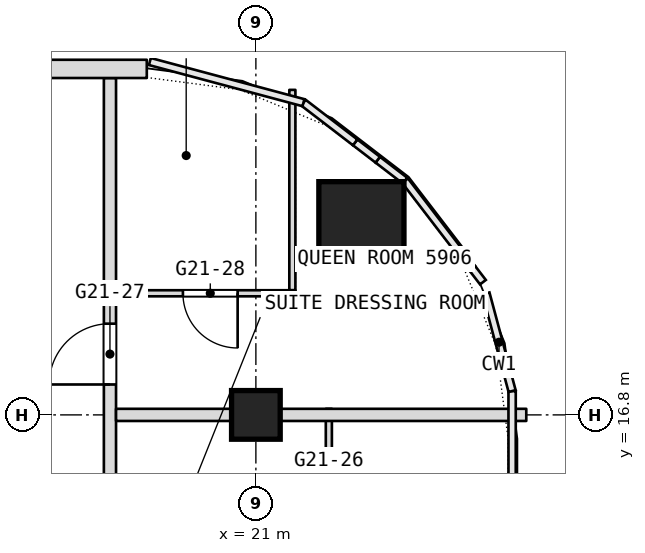
"""IFC4 building model, lengths in metres.
Left out: names, types, materials, properties, quantities, classifications, styles, units other than length and angle.
Written with IfcOpenShell. Run it as: python <this file> out.ifc"""

import sys

from ifc_helpers import new_model, si_unit, direction, frame, frame_2d, origin, origin_2d, place, context, subcontext, project, spatial, rectangle, extrude, element, fill, save


model = new_model("IFC4")
c1 = context("Model", 3, precision=1e-05, world=origin(), true_north=direction((0.0, 1.0)))
c2 = subcontext(c1, "Body", "Model", "MODEL_VIEW")
j1 = project(units=[si_unit("LENGTHUNIT", "METRE"), si_unit("PLANEANGLEUNIT", "RADIAN")], contexts=[c1])
p1 = place(None, origin())
s1 = spatial("IfcSite", under=j1, at=p1, CompositionType="ELEMENT")
p2 = place(p1, origin())
s2 = spatial("IfcBuilding", under=s1, at=p2, CompositionType="ELEMENT")
p3 = place(p2, frame((0.0, 0.0, 248.9)))
s3 = spatial("IfcBuildingStorey", under=s2, at=p3, CompositionType="ELEMENT", Elevation=248.9)
p4 = place(p3, frame((22.736, 19.936, 0.0), z_axis=(0.0, 0.0, 1.0), x_axis=(1.0, 0.0, 0.0)))
e1 = element("IfcColumn", 1, at=p4, inside=s3, PredefinedType="COLUMN", context=c2, shape_type="SweptSolid", body=[
    extrude(rectangle(XDim=1.4, YDim=1.4, at=origin_2d()), origin(), (0.0, 0.0, 1.0), 3.6),
])
p5 = place(p3, frame((21.0, 16.8, 0.0), z_axis=(0.0, 0.0, 1.0), x_axis=(1.0, 0.0, 0.0)))
e2 = element("IfcColumn", 2, at=p5, inside=s3, PredefinedType="COLUMN", context=c2, shape_type="SweptSolid", body=[
    extrude(rectangle(XDim=0.8, YDim=0.8, at=origin_2d()), origin(), (0.0, 0.0, 1.0), 3.6),
])
p6 = place(p3, frame((22.2, 14.45, 0.0), z_axis=(0.0, 0.0, 1.0), x_axis=(0.0, 1.0, 0.0)))
e3 = element("IfcWall", 3, at=p6, inside=s3, PredefinedType="PARTITIONING", context=c2, shape_type="SweptSolid", body=[
    extrude(rectangle(XDim=2.45, YDim=0.1, at=frame_2d((1.225, 0.0))), origin(), (0.0, 0.0, 1.0), 3.3),
])
p7 = place(p6, frame((0.15, 0.0, 0.0)))
e4 = element("IfcOpeningElement", 4, at=p7, cuts=e3, PredefinedType="OPENING", context=c2, shape_type="SweptSolid", body=[
    extrude(rectangle(XDim=0.9, YDim=2.1, at=frame_2d((0.45, 1.05))), frame((0.0, 0.05, 0.0), z_axis=(0.0, -1.0, 0.0), x_axis=(1.0, 0.0, 0.0)), (0.0, 0.0, 1.0), 0.1),
])
p8 = place(p3, frame((21.6, 18.85, 0.0), z_axis=(0.0, 0.0, 1.0), x_axis=(0.0, 1.0, 0.0)))
e5 = element("IfcWall", 5, at=p8, inside=s3, PredefinedType="PARTITIONING", context=c2, shape_type="SweptSolid", body=[
    extrude(rectangle(XDim=3.295, YDim=0.1, at=frame_2d((1.647, 0.0))), origin(), (0.0, 0.0, 1.0), 3.3),
])
p9 = place(p3, frame((18.6, -26.751, 0.0), z_axis=(0.0, 0.0, 1.0), x_axis=(0.0, 1.0, 0.0)))
e6 = element("IfcWall", 6, at=p9, inside=s3, PredefinedType="PARTITIONING", context=c2, shape_type="SweptSolid", body=[
    extrude(rectangle(XDim=49.091, YDim=0.2, at=frame_2d((24.545, 0.0))), origin(), (0.0, 0.0, 1.0), 3.3),
])
p10 = place(p9, frame((4.226, 0.0, 0.0)))
e7 = element("IfcOpeningElement", 7, at=p10, cuts=e6, PredefinedType="OPENING", context=c2, shape_type="SweptSolid", body=[
    extrude(rectangle(XDim=1.8, YDim=2.1, at=frame_2d((0.9, 1.05))), frame((0.0, 0.1, 0.0), z_axis=(0.0, -1.0, 0.0), x_axis=(1.0, 0.0, 0.0)), (0.0, 0.0, 1.0), 0.2),
])
p11 = place(p9, frame((13.251, 0.0, 0.0)))
e8 = element("IfcOpeningElement", 8, at=p11, cuts=e6, PredefinedType="OPENING", context=c2, shape_type="SweptSolid", body=[
    extrude(rectangle(XDim=1.8, YDim=2.1, at=frame_2d((0.9, 1.05))), frame((0.0, 0.1, 0.0), z_axis=(0.0, -1.0, 0.0), x_axis=(1.0, 0.0, 0.0)), (0.0, 0.0, 1.0), 0.2),
])
p12 = place(p9, frame((21.151, 0.0, 0.0)))
e9 = element("IfcOpeningElement", 9, at=p12, cuts=e6, PredefinedType="OPENING", context=c2, shape_type="SweptSolid", body=[
    extrude(rectangle(XDim=1.0, YDim=2.1, at=frame_2d((0.5, 1.05))), frame((0.0, 0.1, 0.0), z_axis=(0.0, -1.0, 0.0), x_axis=(1.0, 0.0, 0.0)), (0.0, 0.0, 1.0), 0.2),
])
p13 = place(p9, frame((22.951, 0.0, 0.0)))
e10 = element("IfcOpeningElement", 10, at=p13, cuts=e6, PredefinedType="OPENING", context=c2, shape_type="SweptSolid", body=[
    extrude(rectangle(XDim=1.0, YDim=2.1, at=frame_2d((0.5, 1.05))), frame((0.0, 0.1, 0.0), z_axis=(0.0, -1.0, 0.0), x_axis=(1.0, 0.0, 0.0)), (0.0, 0.0, 1.0), 0.2),
])
p14 = place(p9, frame((27.151, 0.0, 0.0)))
e11 = element("IfcOpeningElement", 11, at=p14, cuts=e6, PredefinedType="OPENING", context=c2, shape_type="SweptSolid", body=[
    extrude(rectangle(XDim=1.0, YDim=2.1, at=frame_2d((0.5, 1.05))), frame((0.0, 0.1, 0.0), z_axis=(0.0, -1.0, 0.0), x_axis=(1.0, 0.0, 0.0)), (0.0, 0.0, 1.0), 0.2),
])
p15 = place(p9, frame((33.751, 0.0, 0.0)))
e12 = element("IfcOpeningElement", 12, at=p15, cuts=e6, PredefinedType="OPENING", context=c2, shape_type="SweptSolid", body=[
    extrude(rectangle(XDim=1.0, YDim=2.1, at=frame_2d((0.5, 1.05))), frame((0.0, 0.1, 0.0), z_axis=(0.0, -1.0, 0.0), x_axis=(1.0, 0.0, 0.0)), (0.0, 0.0, 1.0), 0.2),
])
p16 = place(p9, frame((38.851, 0.0, 0.0)))
e13 = element("IfcOpeningElement", 13, at=p16, cuts=e6, PredefinedType="OPENING", context=c2, shape_type="SweptSolid", body=[
    extrude(rectangle(XDim=1.1, YDim=2.1, at=frame_2d((0.55, 1.05))), frame((0.0, 0.1, 0.0), z_axis=(0.0, -1.0, 0.0), x_axis=(1.0, 0.0, 0.0)), (0.0, 0.0, 1.0), 0.2),
])
p17 = place(p9, frame((44.051, 0.0, 0.0)))
e14 = element("IfcOpeningElement", 14, at=p17, cuts=e6, PredefinedType="OPENING", context=c2, shape_type="SweptSolid", body=[
    extrude(rectangle(XDim=1.0, YDim=2.1, at=frame_2d((0.5, 1.05))), frame((0.0, 0.1, 0.0), z_axis=(0.0, -1.0, 0.0), x_axis=(1.0, 0.0, 0.0)), (0.0, 0.0, 1.0), 0.2),
])
p18 = place(p3, frame((18.7, 16.8, 0.0), z_axis=(0.0, 0.0, 1.0), x_axis=(1.0, 0.0, 0.0)))
e15 = element("IfcWall", 15, at=p18, inside=s3, PredefinedType="PARTITIONING", context=c2, shape_type="SweptSolid", body=[
    extrude(rectangle(XDim=6.747, YDim=0.2, at=frame_2d((3.374, 0.0))), origin(), (0.0, 0.0, 1.0), 2.9),
])
p19 = place(p3, frame((18.7, 18.8, 0.0), z_axis=(0.0, 0.0, 1.0), x_axis=(1.0, 0.0, 0.0)))
e16 = element("IfcWall", 16, at=p19, inside=s3, PredefinedType="PARTITIONING", context=c2, shape_type="SweptSolid", body=[
    extrude(rectangle(XDim=2.95, YDim=0.1, at=frame_2d((1.475, 0.0))), origin(), (0.0, 0.0, 1.0), 3.3),
])
p20 = place(p19, frame((1.1, 0.0, 0.0)))
e17 = element("IfcOpeningElement", 17, at=p20, cuts=e16, PredefinedType="OPENING", context=c2, shape_type="SweptSolid", body=[
    extrude(rectangle(XDim=0.9, YDim=2.1, at=frame_2d((0.45, 1.05))), frame((0.0, 0.05, 0.0), z_axis=(0.0, -1.0, 0.0), x_axis=(1.0, 0.0, 0.0)), (0.0, 0.0, 1.0), 0.1),
])
p21 = place(p3, frame((19.206, 22.49, 0.0), z_axis=(0.0, 0.0, 1.0), x_axis=(-1.0, 0.0, 0.0)))
e18 = element("IfcWall", 18, at=p21, inside=s3, PredefinedType="NOTDEFINED", context=c2, shape_type="SweptSolid", body=[
    extrude(rectangle(XDim=38.412, YDim=0.3, at=frame_2d((19.206, 0.0))), origin(), (0.0, 0.0, 1.0), 3.6),
])
p22 = place(p21, frame((3.306, 0.0, 0.9)))
e19 = element("IfcOpeningElement", 19, at=p22, cuts=e18, PredefinedType="OPENING", context=c2, shape_type="SweptSolid", body=[
    extrude(rectangle(XDim=2.4, YDim=2.1, at=frame_2d((1.2, 1.05))), frame((0.0, 0.15, 0.0), z_axis=(0.0, -1.0, 0.0), x_axis=(1.0, 0.0, 0.0)), (0.0, 0.0, 1.0), 0.3),
])
p23 = place(p21, frame((7.506, 0.0, 0.9)))
e20 = element("IfcOpeningElement", 20, at=p23, cuts=e18, PredefinedType="OPENING", context=c2, shape_type="SweptSolid", body=[
    extrude(rectangle(XDim=2.4, YDim=2.1, at=frame_2d((1.2, 1.05))), frame((0.0, 0.15, 0.0), z_axis=(0.0, -1.0, 0.0), x_axis=(1.0, 0.0, 0.0)), (0.0, 0.0, 1.0), 0.3),
])
p24 = place(p21, frame((11.706, 0.0, 0.9)))
e21 = element("IfcOpeningElement", 21, at=p24, cuts=e18, PredefinedType="OPENING", context=c2, shape_type="SweptSolid", body=[
    extrude(rectangle(XDim=2.4, YDim=2.1, at=frame_2d((1.2, 1.05))), frame((0.0, 0.15, 0.0), z_axis=(0.0, -1.0, 0.0), x_axis=(1.0, 0.0, 0.0)), (0.0, 0.0, 1.0), 0.3),
])
p25 = place(p21, frame((15.906, 0.0, 0.9)))
e22 = element("IfcOpeningElement", 22, at=p25, cuts=e18, PredefinedType="OPENING", context=c2, shape_type="SweptSolid", body=[
    extrude(rectangle(XDim=2.4, YDim=2.1, at=frame_2d((1.2, 1.05))), frame((0.0, 0.15, 0.0), z_axis=(0.0, -1.0, 0.0), x_axis=(1.0, 0.0, 0.0)), (0.0, 0.0, 1.0), 0.3),
])
p26 = place(p21, frame((20.106, 0.0, 0.9)))
e23 = element("IfcOpeningElement", 23, at=p26, cuts=e18, PredefinedType="OPENING", context=c2, shape_type="SweptSolid", body=[
    extrude(rectangle(XDim=2.4, YDim=2.1, at=frame_2d((1.2, 1.05))), frame((0.0, 0.15, 0.0), z_axis=(0.0, -1.0, 0.0), x_axis=(1.0, 0.0, 0.0)), (0.0, 0.0, 1.0), 0.3),
])
p27 = place(p21, frame((24.306, 0.0, 0.9)))
e24 = element("IfcOpeningElement", 24, at=p27, cuts=e18, PredefinedType="OPENING", context=c2, shape_type="SweptSolid", body=[
    extrude(rectangle(XDim=2.4, YDim=2.1, at=frame_2d((1.2, 1.05))), frame((0.0, 0.15, 0.0), z_axis=(0.0, -1.0, 0.0), x_axis=(1.0, 0.0, 0.0)), (0.0, 0.0, 1.0), 0.3),
])
p28 = place(p21, frame((28.506, 0.0, 0.9)))
e25 = element("IfcOpeningElement", 25, at=p28, cuts=e18, PredefinedType="OPENING", context=c2, shape_type="SweptSolid", body=[
    extrude(rectangle(XDim=2.4, YDim=2.1, at=frame_2d((1.2, 1.05))), frame((0.0, 0.15, 0.0), z_axis=(0.0, -1.0, 0.0), x_axis=(1.0, 0.0, 0.0)), (0.0, 0.0, 1.0), 0.3),
])
p29 = place(p21, frame((32.706, 0.0, 0.9)))
e26 = element("IfcOpeningElement", 26, at=p29, cuts=e18, PredefinedType="OPENING", context=c2, shape_type="SweptSolid", body=[
    extrude(rectangle(XDim=2.4, YDim=2.1, at=frame_2d((1.2, 1.05))), frame((0.0, 0.15, 0.0), z_axis=(0.0, -1.0, 0.0), x_axis=(1.0, 0.0, 0.0)), (0.0, 0.0, 1.0), 0.3),
])
p30 = place(p17, origin())
e27 = element("IfcDoor", 27, at=p30, inside=s3, OperationType="SINGLE_SWING_LEFT", PredefinedType="DOOR", context=c2, shape_type="SweptSolid", body=[
    extrude(rectangle(XDim=1.0, YDim=2.1, at=frame_2d((0.5, 1.05))), frame((0.0, 0.025, 0.0), z_axis=(0.0, -1.0, 0.0), x_axis=(1.0, 0.0, 0.0)), (0.0, 0.0, 1.0), 0.05),
])
fill(e14, e27)
p31 = place(p20, origin())
e28 = element("IfcDoor", 28, at=p31, inside=s3, OperationType="SINGLE_SWING_RIGHT", PredefinedType="DOOR", context=c2, shape_type="SweptSolid", body=[
    extrude(rectangle(XDim=0.9, YDim=2.1, at=frame_2d((0.45, 1.05))), frame((0.0, 0.025, 0.0), z_axis=(0.0, -1.0, 0.0), x_axis=(1.0, 0.0, 0.0)), (0.0, 0.0, 1.0), 0.05),
])
fill(e17, e28)
save(model, sys.argv[1])
